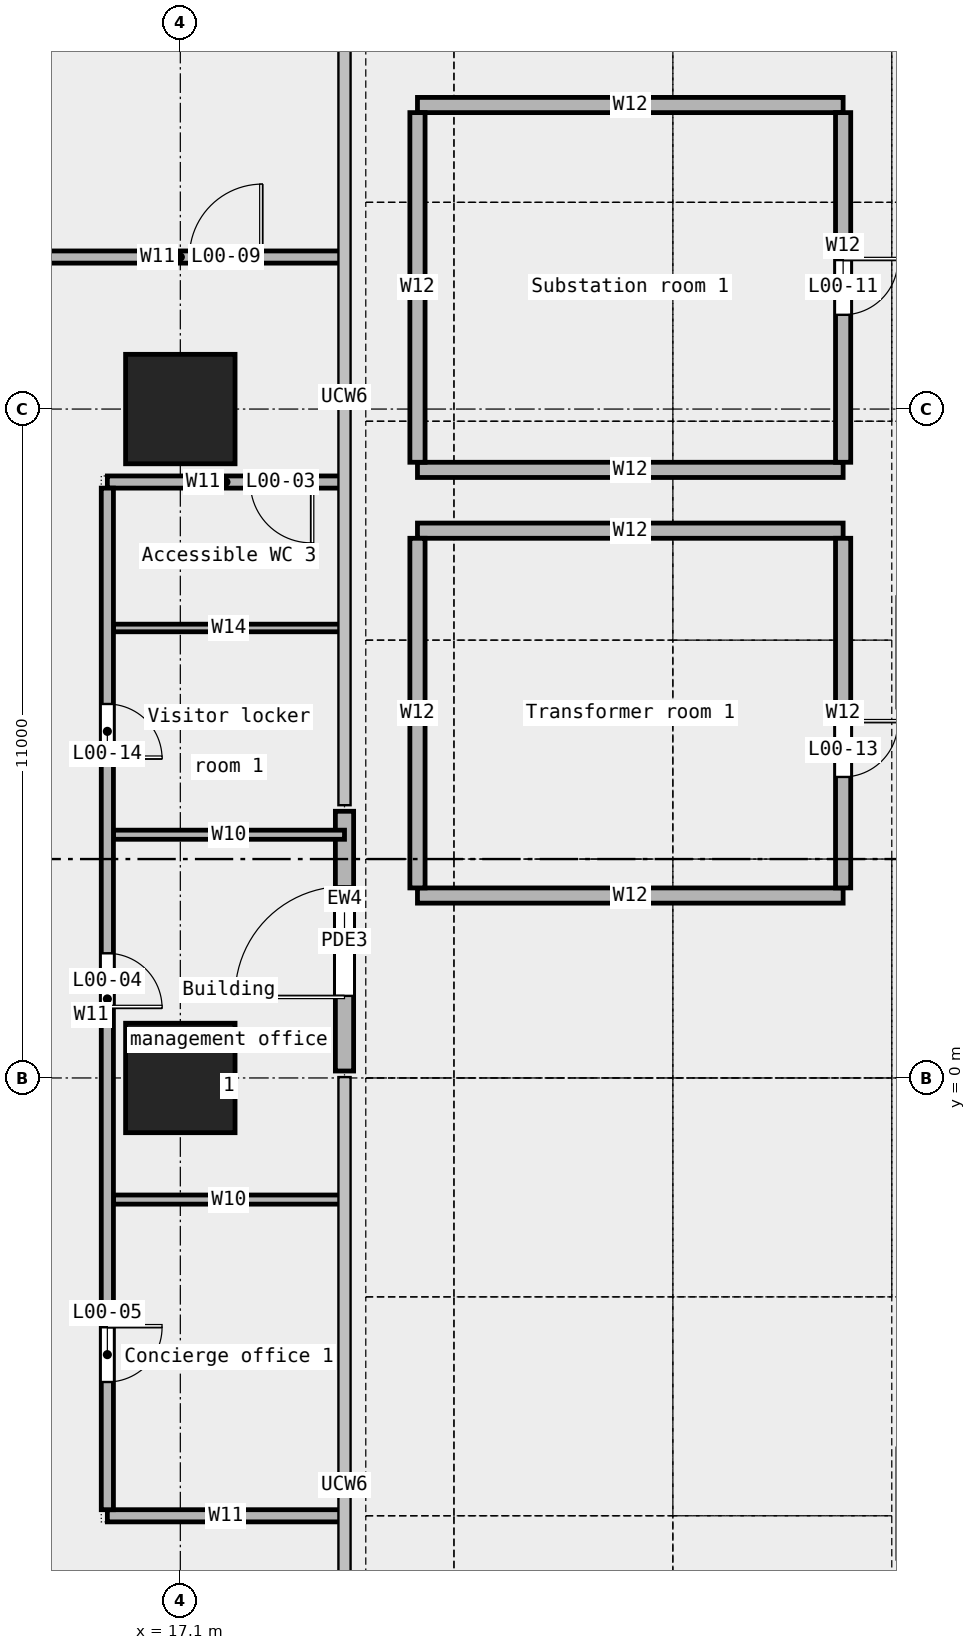
"""IFC4 building model, lengths in metres.
Left out: names, types, materials, properties, quantities, classifications, styles, units other than length and angle.
Written with IfcOpenShell. Run it as: python <this file> out.ifc"""

import sys

from ifc_helpers import new_model, si_unit, direction, frame, frame_2d, origin, origin_2d, place, context, subcontext, project, spatial, rectangle, extrude, element, fill, save


model = new_model("IFC4")
c1 = context("Model", 3, precision=1e-05, world=origin(), true_north=direction((0.0, 1.0)))
c2 = subcontext(c1, "Body", "Model", "MODEL_VIEW")
j1 = project(units=[si_unit("LENGTHUNIT", "METRE"), si_unit("PLANEANGLEUNIT", "RADIAN")], contexts=[c1])
p1 = place(None, origin())
s1 = spatial("IfcSite", under=j1, at=p1, CompositionType="ELEMENT")
p2 = place(p1, origin())
s2 = spatial("IfcBuilding", under=s1, at=p2, CompositionType="ELEMENT")
p3 = place(p2, origin())
s3 = spatial("IfcBuildingStorey", under=s2, at=p3, CompositionType="ELEMENT", Elevation=0.0)
for number, where, z_axis, x_axis in (
    (1, (17.1, 0.0, 0.0), (0.0, 0.0, 1.0), (1.0, 0.0, 0.0)),
    (2, (17.1, 11.0, 0.0), (0.0, 0.0, 1.0), (1.0, 0.0, 0.0)),
):
    element("IfcColumn", number, at=place(p3, frame(where, z_axis=z_axis, x_axis=x_axis)), inside=s3, PredefinedType="COLUMN", context=c2, shape_type="SweptSolid", body=[
        extrude(rectangle(XDim=1.8, YDim=1.8, at=origin_2d()), origin(), (0.0, 0.0, 1.0), 7.8),
    ])
p4 = place(p3, frame((19.8, 0.114, 0.0), z_axis=(0.0, 0.0, 1.0), x_axis=(0.0, 1.0, 0.0)))
e3 = element("IfcWall", 3, at=p4, inside=s3, PredefinedType="STANDARD", context=c2, shape_type="SweptSolid", body=[
    extrude(rectangle(XDim=4.271, YDim=0.3, at=frame_2d((2.136, 0.0))), origin(), (0.0, 0.0, 1.0), 7.8),
])
p5 = place(p4, frame((1.236, 0.0, 0.0)))
e4 = element("IfcOpeningElement", 4, at=p5, cuts=e3, PredefinedType="OPENING", context=c2, shape_type="SweptSolid", body=[
    extrude(rectangle(XDim=1.8, YDim=2.4, at=frame_2d((0.9, 1.2))), frame((0.0, 0.162, 0.0), z_axis=(0.0, -1.0, 0.0), x_axis=(1.0, 0.0, 0.0)), (0.0, 0.0, 1.0), 0.324),
])
p6 = place(p3, frame((15.9, -7.2, 0.0), z_axis=(0.0, 0.0, 1.0), x_axis=(1.0, 0.0, 0.0)))
e5 = element("IfcWall", 5, at=p6, inside=s3, PredefinedType="PARTITIONING", context=c2, shape_type="SweptSolid", body=[
    extrude(rectangle(XDim=3.9, YDim=0.2, at=frame_2d((1.95, 0.0))), origin(), (0.0, 0.0, 1.0), 7.8),
])
p7 = place(p3, frame((16.0, -2.0, 0.0), z_axis=(0.0, 0.0, 1.0), x_axis=(1.0, 0.0, 0.0)))
e6 = element("IfcWall", 6, at=p7, inside=s3, PredefinedType="PARTITIONING", context=c2, shape_type="SweptSolid", body=[
    extrude(rectangle(XDim=3.8, YDim=0.15, at=frame_2d((1.9, 0.0))), origin(), (0.0, 0.0, 1.0), 7.8),
])
p8 = place(p3, frame((21.0, 3.0, 0.0), z_axis=(0.0, 0.0, 1.0), x_axis=(1.0, 0.0, 0.0)))
e7 = element("IfcWall", 7, at=p8, inside=s3, PredefinedType="PARTITIONING", context=c2, shape_type="SweptSolid", body=[
    extrude(rectangle(XDim=7.0, YDim=0.25, at=frame_2d((3.5, 0.0))), origin(), (0.0, 0.0, 1.0), 7.8),
])
p9 = place(p3, frame((16.0, 4.0, 0.0), z_axis=(0.0, 0.0, 1.0), x_axis=(1.0, 0.0, 0.0)))
e8 = element("IfcWall", 8, at=p9, inside=s3, PredefinedType="PARTITIONING", context=c2, shape_type="SweptSolid", body=[
    extrude(rectangle(XDim=3.8, YDim=0.15, at=frame_2d((1.9, 0.0))), origin(), (0.0, 0.0, 1.0), 7.8),
])
p10 = place(p3, frame((16.0, 7.4, 0.0), z_axis=(0.0, 0.0, 1.0), x_axis=(1.0, 0.0, 0.0)))
e9 = element("IfcWall", 9, at=p10, inside=s3, PredefinedType="PARTITIONING", context=c2, shape_type="SweptSolid", body=[
    extrude(rectangle(XDim=3.8, YDim=0.125, at=frame_2d((1.9, 0.0))), origin(), (0.0, 0.0, 1.0), 7.8),
])
p11 = place(p3, frame((21.0, 9.0, 0.0), z_axis=(0.0, 0.0, 1.0), x_axis=(1.0, 0.0, 0.0)))
e10 = element("IfcWall", 10, at=p11, inside=s3, PredefinedType="PARTITIONING", context=c2, shape_type="SweptSolid", body=[
    extrude(rectangle(XDim=7.0, YDim=0.25, at=frame_2d((3.5, 0.0))), origin(), (0.0, 0.0, 1.0), 7.8),
])
p12 = place(p3, frame((15.9, 9.8, 0.0), z_axis=(0.0, 0.0, 1.0), x_axis=(1.0, 0.0, 0.0)))
e11 = element("IfcWall", 11, at=p12, inside=s3, PredefinedType="PARTITIONING", context=c2, shape_type="SweptSolid", body=[
    extrude(rectangle(XDim=3.9, YDim=0.2, at=frame_2d((1.95, 0.0))), origin(), (0.0, 0.0, 1.0), 7.8),
])
p13 = place(p12, frame((2.35, 0.0, 0.0)))
e12 = element("IfcOpeningElement", 12, at=p13, cuts=e11, PredefinedType="OPENING", context=c2, shape_type="SweptSolid", body=[
    extrude(rectangle(XDim=1.0, YDim=2.1, at=frame_2d((0.5, 1.05))), frame((0.0, 0.112, 0.0), z_axis=(0.0, -1.0, 0.0), x_axis=(1.0, 0.0, 0.0)), (0.0, 0.0, 1.0), 0.224),
])
p14 = place(p3, frame((21.0, 10.0, 0.0), z_axis=(0.0, 0.0, 1.0), x_axis=(1.0, 0.0, 0.0)))
e13 = element("IfcWall", 13, at=p14, inside=s3, PredefinedType="PARTITIONING", context=c2, shape_type="SweptSolid", body=[
    extrude(rectangle(XDim=7.0, YDim=0.25, at=frame_2d((3.5, 0.0))), origin(), (0.0, 0.0, 1.0), 7.8),
])
p15 = place(p3, frame((14.4, 13.5, 0.0), z_axis=(0.0, 0.0, 1.0), x_axis=(1.0, 0.0, 0.0)))
e14 = element("IfcWall", 14, at=p15, inside=s3, PredefinedType="PARTITIONING", context=c2, shape_type="SweptSolid", body=[
    extrude(rectangle(XDim=5.4, YDim=0.2, at=frame_2d((2.7, 0.0))), origin(), (0.0, 0.0, 1.0), 7.8),
])
p16 = place(p15, frame((2.85, 0.0, 0.0)))
e15 = element("IfcOpeningElement", 15, at=p16, cuts=e14, PredefinedType="OPENING", context=c2, shape_type="SweptSolid", body=[
    extrude(rectangle(XDim=1.2, YDim=2.1, at=frame_2d((0.6, 1.05))), frame((0.0, 0.112, 0.0), z_axis=(0.0, -1.0, 0.0), x_axis=(1.0, 0.0, 0.0)), (0.0, 0.0, 1.0), 0.224),
])
p17 = place(p3, frame((21.0, 16.0, 0.0), z_axis=(0.0, 0.0, 1.0), x_axis=(1.0, 0.0, 0.0)))
e16 = element("IfcWall", 16, at=p17, inside=s3, PredefinedType="PARTITIONING", context=c2, shape_type="SweptSolid", body=[
    extrude(rectangle(XDim=7.0, YDim=0.25, at=frame_2d((3.5, 0.0))), origin(), (0.0, 0.0, 1.0), 7.8),
])
p18 = place(p3, frame((15.9, -7.1, 0.0), z_axis=(0.0, 0.0, 1.0), x_axis=(0.0, 1.0, 0.0)))
e17 = element("IfcWall", 17, at=p18, inside=s3, PredefinedType="PARTITIONING", context=c2, shape_type="SweptSolid", body=[
    extrude(rectangle(XDim=16.8, YDim=0.2, at=frame_2d((8.4, 0.0))), origin(), (0.0, 0.0, 1.0), 7.8),
])
p19 = place(p18, frame((8.25, 0.0, 0.0)))
e18 = element("IfcOpeningElement", 18, at=p19, cuts=e17, PredefinedType="OPENING", context=c2, shape_type="SweptSolid", body=[
    extrude(rectangle(XDim=0.9, YDim=2.1, at=frame_2d((0.45, 1.05))), frame((0.0, 0.112, 0.0), z_axis=(0.0, -1.0, 0.0), x_axis=(1.0, 0.0, 0.0)), (0.0, 0.0, 1.0), 0.224),
])
p20 = place(p18, frame((2.1, 0.0, 0.0)))
e19 = element("IfcOpeningElement", 19, at=p20, cuts=e17, PredefinedType="OPENING", context=c2, shape_type="SweptSolid", body=[
    extrude(rectangle(XDim=0.9, YDim=2.1, at=frame_2d((0.45, 1.05))), frame((0.0, 0.112, 0.0), z_axis=(0.0, -1.0, 0.0), x_axis=(1.0, 0.0, 0.0)), (0.0, 0.0, 1.0), 0.224),
])
p21 = place(p18, frame((12.35, 0.0, 0.0)))
e20 = element("IfcOpeningElement", 20, at=p21, cuts=e17, PredefinedType="OPENING", context=c2, shape_type="SweptSolid", body=[
    extrude(rectangle(XDim=0.9, YDim=2.1, at=frame_2d((0.45, 1.05))), frame((0.0, 0.112, 0.0), z_axis=(0.0, -1.0, 0.0), x_axis=(1.0, 0.0, 0.0)), (0.0, 0.0, 1.0), 0.224),
])
for number, where, z_axis, x_axis in (
    (21, (21.0, 3.125, 0.0), (0.0, 0.0, 1.0), (0.0, 1.0, 0.0)),
    (22, (21.0, 10.125, 0.0), (0.0, 0.0, 1.0), (0.0, 1.0, 0.0)),
):
    element("IfcWall", number, at=place(p3, frame(where, z_axis=z_axis, x_axis=x_axis)), inside=s3, PredefinedType="PARTITIONING", context=c2, shape_type="SweptSolid", body=[
        extrude(rectangle(XDim=5.75, YDim=0.25, at=frame_2d((2.875, 0.0))), origin(), (0.0, 0.0, 1.0), 7.8),
    ])
p22 = place(p3, frame((28.0, 3.125, 0.0), z_axis=(0.0, 0.0, 1.0), x_axis=(0.0, 1.0, 0.0)))
e23 = element("IfcWall", 23, at=p22, inside=s3, PredefinedType="PARTITIONING", context=c2, shape_type="SweptSolid", body=[
    extrude(rectangle(XDim=5.75, YDim=0.25, at=frame_2d((2.875, 0.0))), origin(), (0.0, 0.0, 1.0), 7.8),
])
p23 = place(p22, frame((1.825, 0.0, 0.0)))
e24 = element("IfcOpeningElement", 24, at=p23, cuts=e23, PredefinedType="OPENING", context=c2, shape_type="SweptSolid", body=[
    extrude(rectangle(XDim=0.9, YDim=2.1, at=frame_2d((0.45, 1.05))), frame((0.0, 0.137, 0.0), z_axis=(0.0, -1.0, 0.0), x_axis=(1.0, 0.0, 0.0)), (0.0, 0.0, 1.0), 0.274),
])
p24 = place(p3, frame((28.0, 10.125, 0.0), z_axis=(0.0, 0.0, 1.0), x_axis=(0.0, 1.0, 0.0)))
e25 = element("IfcWall", 25, at=p24, inside=s3, PredefinedType="PARTITIONING", context=c2, shape_type="SweptSolid", body=[
    extrude(rectangle(XDim=5.75, YDim=0.25, at=frame_2d((2.875, 0.0))), origin(), (0.0, 0.0, 1.0), 7.8),
])
p25 = place(p24, frame((2.425, 0.0, 0.0)))
e26 = element("IfcOpeningElement", 26, at=p25, cuts=e25, PredefinedType="OPENING", context=c2, shape_type="SweptSolid", body=[
    extrude(rectangle(XDim=0.9, YDim=2.1, at=frame_2d((0.45, 1.05))), frame((0.0, 0.137, 0.0), z_axis=(0.0, -1.0, 0.0), x_axis=(1.0, 0.0, 0.0)), (0.0, 0.0, 1.0), 0.274),
])
p26 = place(p5, origin())
e27 = element("IfcDoor", 27, at=p26, inside=s3, OperationType="DOUBLE_DOOR_SINGLE_SWING", PredefinedType="DOOR", context=c2, shape_type="SweptSolid", body=[
    extrude(rectangle(XDim=1.8, YDim=2.4, at=frame_2d((0.9, 1.2))), frame((0.0, 0.025, 0.0), z_axis=(0.0, -1.0, 0.0), x_axis=(1.0, 0.0, 0.0)), (0.0, 0.0, 1.0), 0.05),
])
fill(e4, e27)
p27 = place(p13, origin())
e28 = element("IfcDoor", 28, at=p27, inside=s3, OperationType="SINGLE_SWING_LEFT", PredefinedType="DOOR", context=c2, shape_type="SweptSolid", body=[
    extrude(rectangle(XDim=1.0, YDim=2.1, at=frame_2d((0.5, 1.05))), frame((0.0, 0.025, 0.0), z_axis=(0.0, -1.0, 0.0), x_axis=(1.0, 0.0, 0.0)), (0.0, 0.0, 1.0), 0.05),
])
fill(e12, e28)
p28 = place(p19, origin())
e29 = element("IfcDoor", 29, at=p28, inside=s3, OperationType="SINGLE_SWING_RIGHT", PredefinedType="DOOR", context=c2, shape_type="SweptSolid", body=[
    extrude(rectangle(XDim=0.9, YDim=2.1, at=frame_2d((0.45, 1.05))), frame((0.0, 0.025, 0.0), z_axis=(0.0, -1.0, 0.0), x_axis=(1.0, 0.0, 0.0)), (0.0, 0.0, 1.0), 0.05),
])
fill(e18, e29)
p29 = place(p20, origin())
e30 = element("IfcDoor", 30, at=p29, inside=s3, OperationType="SINGLE_SWING_LEFT", PredefinedType="DOOR", context=c2, shape_type="SweptSolid", body=[
    extrude(rectangle(XDim=0.9, YDim=2.1, at=frame_2d((0.45, 1.05))), frame((0.0, 0.025, 0.0), z_axis=(0.0, -1.0, 0.0), x_axis=(1.0, 0.0, 0.0)), (0.0, 0.0, 1.0), 0.05),
])
fill(e19, e30)
p30 = place(p16, origin())
e31 = element("IfcDoor", 31, at=p30, inside=s3, OperationType="SINGLE_SWING_RIGHT", PredefinedType="DOOR", context=c2, shape_type="SweptSolid", body=[
    extrude(rectangle(XDim=1.2, YDim=2.1, at=frame_2d((0.6, 1.05))), frame((0.0, 0.025, 0.0), z_axis=(0.0, -1.0, 0.0), x_axis=(1.0, 0.0, 0.0)), (0.0, 0.0, 1.0), 0.05),
])
fill(e15, e31)
p31 = place(p25, origin())
e32 = element("IfcDoor", 32, at=p31, inside=s3, OperationType="SINGLE_SWING_LEFT", PredefinedType="DOOR", context=c2, shape_type="SweptSolid", body=[
    extrude(rectangle(XDim=0.9, YDim=2.1, at=frame_2d((0.45, 1.05))), frame((0.0, 0.025, 0.0), z_axis=(0.0, -1.0, 0.0), x_axis=(1.0, 0.0, 0.0)), (0.0, 0.0, 1.0), 0.05),
])
fill(e26, e32)
p32 = place(p23, origin())
e33 = element("IfcDoor", 33, at=p32, inside=s3, OperationType="SINGLE_SWING_LEFT", PredefinedType="DOOR", context=c2, shape_type="SweptSolid", body=[
    extrude(rectangle(XDim=0.9, YDim=2.1, at=frame_2d((0.45, 1.05))), frame((0.0, 0.025, 0.0), z_axis=(0.0, -1.0, 0.0), x_axis=(1.0, 0.0, 0.0)), (0.0, 0.0, 1.0), 0.05),
])
fill(e24, e33)
p33 = place(p21, origin())
e34 = element("IfcDoor", 34, at=p33, inside=s3, OperationType="SINGLE_SWING_RIGHT", PredefinedType="DOOR", context=c2, shape_type="SweptSolid", body=[
    extrude(rectangle(XDim=0.9, YDim=2.1, at=frame_2d((0.45, 1.05))), frame((0.0, 0.025, 0.0), z_axis=(0.0, -1.0, 0.0), x_axis=(1.0, 0.0, 0.0)), (0.0, 0.0, 1.0), 0.05),
])
fill(e20, e34)
save(model, sys.argv[1])
